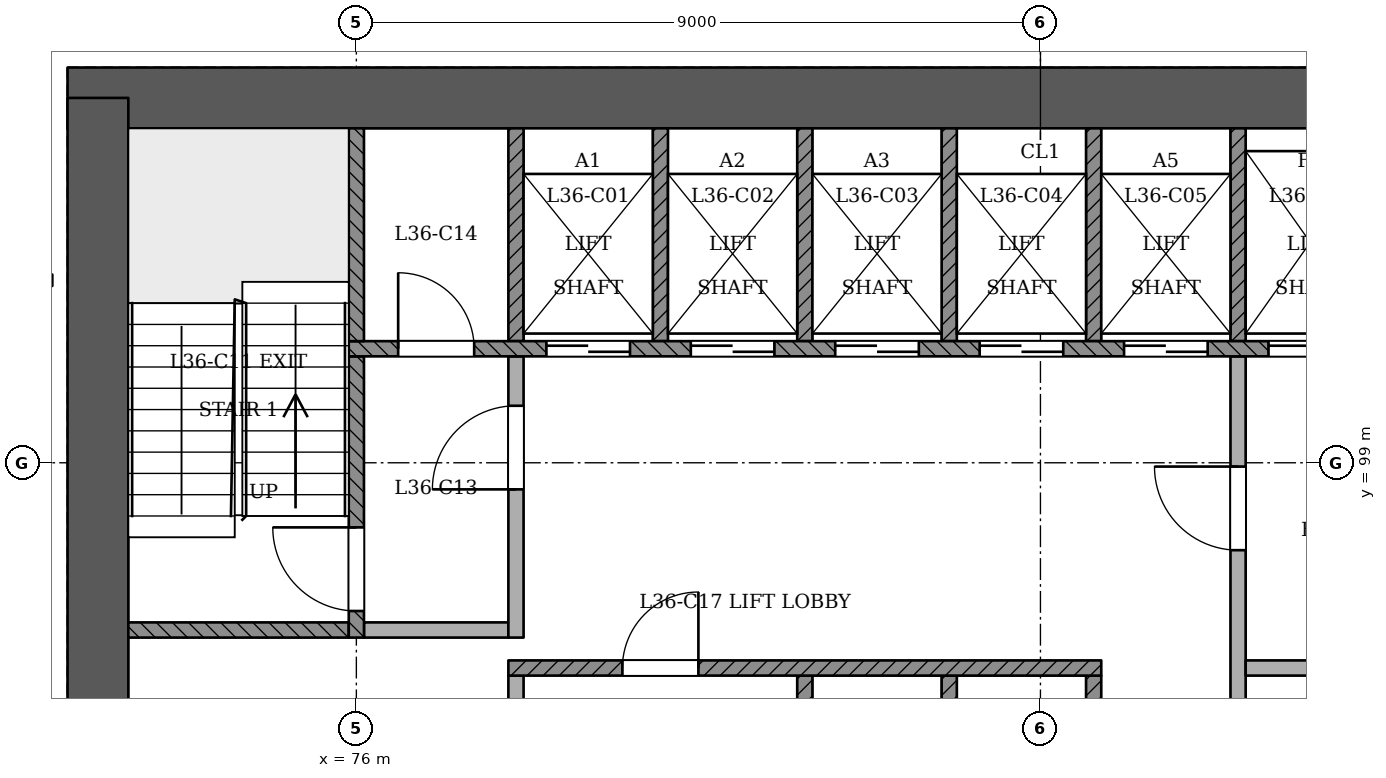
"""IFC4 building model, lengths in metres.
Left out: names, types, materials, properties, quantities, classifications, styles, units other than length and angle.
Written with IfcOpenShell. Run it as: python <this file> out.ifc"""

import sys

from ifc_helpers import new_model, si_unit, direction, frame, frame_2d, origin, place, context, subcontext, project, spatial, rectangle, extrude, element, fill, save


model = new_model("IFC4")
c1 = context("Model", 3, precision=1e-05, world=origin(), true_north=direction((0.0, 1.0)))
c2 = subcontext(c1, "Body", "Model", "MODEL_VIEW")
j1 = project(units=[si_unit("LENGTHUNIT", "METRE"), si_unit("PLANEANGLEUNIT", "RADIAN")], contexts=[c1])
p1 = place(None, origin())
s1 = spatial("IfcSite", under=j1, at=p1, CompositionType="ELEMENT")
p2 = place(p1, origin())
s2 = spatial("IfcBuilding", under=s1, at=p2, CompositionType="ELEMENT")
p3 = place(p2, frame((0.0, 0.0, 142.2)))
s3 = spatial("IfcBuildingStorey", under=s2, at=p3, CompositionType="ELEMENT", Elevation=142.2)
p4 = place(p3, frame((97.4, 103.8, 0.0), z_axis=(0.0, 0.0, 1.0), x_axis=(-1.0, 0.0, 0.0)))
e1 = element("IfcWall", 1, at=p4, inside=s3, PredefinedType="SHEAR", context=c2, shape_type="SweptSolid", body=[
    extrude(rectangle(XDim=25.2, YDim=0.8, at=frame_2d((12.6, 0.0))), origin(), (0.0, 0.0, 1.0), 3.6),
])
p5 = place(p3, frame((72.6, 103.8, 0.0), z_axis=(0.0, 0.0, 1.0), x_axis=(0.0, -1.0, 0.0)))
e2 = element("IfcWall", 2, at=p5, inside=s3, PredefinedType="SHEAR", context=c2, shape_type="SweptSolid", body=[
    extrude(rectangle(XDim=11.2, YDim=0.8, at=frame_2d((5.6, 0.0))), origin(), (0.0, 0.0, 1.0), 3.6),
])
p6 = place(p3, frame((64.449, 99.517, 0.0), z_axis=(0.0, 0.0, 1.0), x_axis=(0.499425839766, -0.866356641675, 0.0)))
e3 = element("IfcWall", 3, at=p6, inside=s3, PredefinedType="PARTITIONING", context=c2, shape_type="SweptSolid", body=[
    extrude(rectangle(XDim=41.118, YDim=0.15, at=frame_2d((20.559, 0.0))), origin(), (0.0, 0.0, 1.0), 2.75),
])
p7 = place(p6, frame((0.951, 0.0, 0.0)))
e4 = element("IfcOpeningElement", 4, at=p7, cuts=e3, PredefinedType="OPENING", context=c2, shape_type="SweptSolid", body=[
    extrude(rectangle(XDim=1.2, YDim=2.1, at=frame_2d((0.6, 1.05))), frame((0.0, 0.085, 0.0), z_axis=(0.0, -1.0, 0.0), x_axis=(1.0, 0.0, 0.0)), (0.0, 0.0, 1.0), 0.171),
])
p8 = place(p6, frame((10.552, 0.0, 0.0)))
e5 = element("IfcOpeningElement", 5, at=p8, cuts=e3, PredefinedType="OPENING", context=c2, shape_type="SweptSolid", body=[
    extrude(rectangle(XDim=1.0, YDim=2.1, at=frame_2d((0.5, 1.05))), frame((0.0, 0.085, 0.0), z_axis=(0.0, -1.0, 0.0), x_axis=(1.0, 0.0, 0.0)), (0.0, 0.0, 1.0), 0.171),
])
p9 = place(p6, frame((12.762, 0.0, 0.0)))
e6 = element("IfcOpeningElement", 6, at=p9, cuts=e3, PredefinedType="OPENING", context=c2, shape_type="SweptSolid", body=[
    extrude(rectangle(XDim=1.0, YDim=2.1, at=frame_2d((0.5, 1.05))), frame((0.0, 0.085, 0.0), z_axis=(0.0, -1.0, 0.0), x_axis=(1.0, 0.0, 0.0)), (0.0, 0.0, 1.0), 0.171),
])
p10 = place(p6, frame((20.557, 0.0, 0.0)))
e7 = element("IfcOpeningElement", 7, at=p10, cuts=e3, PredefinedType="OPENING", context=c2, shape_type="SweptSolid", body=[
    extrude(rectangle(XDim=1.2, YDim=2.1, at=frame_2d((0.6, 1.05))), frame((0.0, 0.085, 0.0), z_axis=(0.0, -1.0, 0.0), x_axis=(1.0, 0.0, 0.0)), (0.0, 0.0, 1.0), 0.171),
])
p11 = place(p6, frame((28.436, 0.0, 0.0)))
e8 = element("IfcOpeningElement", 8, at=p11, cuts=e3, PredefinedType="OPENING", context=c2, shape_type="SweptSolid", body=[
    extrude(rectangle(XDim=1.0, YDim=2.1, at=frame_2d((0.5, 1.05))), frame((0.0, 0.085, 0.0), z_axis=(0.0, -1.0, 0.0), x_axis=(1.0, 0.0, 0.0)), (0.0, 0.0, 1.0), 0.171),
])
p12 = place(p6, frame((32.957, 0.0, 0.0)))
e9 = element("IfcOpeningElement", 9, at=p12, cuts=e3, PredefinedType="OPENING", context=c2, shape_type="SweptSolid", body=[
    extrude(rectangle(XDim=1.2, YDim=2.1, at=frame_2d((0.6, 1.05))), frame((0.0, 0.085, 0.0), z_axis=(0.0, -1.0, 0.0), x_axis=(1.0, 0.0, 0.0)), (0.0, 0.0, 1.0), 0.171),
])
p13 = place(p6, frame((39.53, 0.0, 0.0)))
e10 = element("IfcOpeningElement", 10, at=p13, cuts=e3, PredefinedType="OPENING", context=c2, shape_type="SweptSolid", body=[
    extrude(rectangle(XDim=1.0, YDim=2.1, at=frame_2d((0.5, 1.05))), frame((0.0, 0.085, 0.0), z_axis=(0.0, -1.0, 0.0), x_axis=(1.0, 0.0, 0.0)), (0.0, 0.0, 1.0), 0.171),
])
p14 = place(p3, frame((85.065, 63.98, 0.0), z_axis=(0.0, 0.0, 1.0), x_axis=(0.499427357949, 0.866355766491, 0.0)))
e11 = element("IfcWall", 11, at=p14, inside=s3, PredefinedType="PARTITIONING", context=c2, shape_type="SweptSolid", body=[
    extrude(rectangle(XDim=41.02, YDim=0.15, at=frame_2d((20.51, 0.0))), origin(), (0.0, 0.0, 1.0), 2.75),
])
p15 = place(p14, frame((0.382, 0.0, 0.0)))
e12 = element("IfcOpeningElement", 12, at=p15, cuts=e11, PredefinedType="OPENING", context=c2, shape_type="SweptSolid", body=[
    extrude(rectangle(XDim=1.2, YDim=2.1, at=frame_2d((0.6, 1.05))), frame((0.0, 0.085, 0.0), z_axis=(0.0, -1.0, 0.0), x_axis=(1.0, 0.0, 0.0)), (0.0, 0.0, 1.0), 0.171),
])
p16 = place(p14, frame((2.583, 0.0, 0.0)))
e13 = element("IfcOpeningElement", 13, at=p16, cuts=e11, PredefinedType="OPENING", context=c2, shape_type="SweptSolid", body=[
    extrude(rectangle(XDim=1.0, YDim=2.1, at=frame_2d((0.5, 1.05))), frame((0.0, 0.085, 0.0), z_axis=(0.0, -1.0, 0.0), x_axis=(1.0, 0.0, 0.0)), (0.0, 0.0, 1.0), 0.171),
])
p17 = place(p14, frame((8.113, 0.0, 0.0)))
e14 = element("IfcOpeningElement", 14, at=p17, cuts=e11, PredefinedType="OPENING", context=c2, shape_type="SweptSolid", body=[
    extrude(rectangle(XDim=1.0, YDim=2.1, at=frame_2d((0.5, 1.05))), frame((0.0, 0.085, 0.0), z_axis=(0.0, -1.0, 0.0), x_axis=(1.0, 0.0, 0.0)), (0.0, 0.0, 1.0), 0.171),
])
p18 = place(p14, frame((11.467, 0.0, 0.0)))
e15 = element("IfcOpeningElement", 15, at=p18, cuts=e11, PredefinedType="OPENING", context=c2, shape_type="SweptSolid", body=[
    extrude(rectangle(XDim=1.0, YDim=2.1, at=frame_2d((0.5, 1.05))), frame((0.0, 0.085, 0.0), z_axis=(0.0, -1.0, 0.0), x_axis=(1.0, 0.0, 0.0)), (0.0, 0.0, 1.0), 0.171),
])
p19 = place(p14, frame((18.142, 0.0, 0.0)))
e16 = element("IfcOpeningElement", 16, at=p19, cuts=e11, PredefinedType="OPENING", context=c2, shape_type="SweptSolid", body=[
    extrude(rectangle(XDim=1.0, YDim=2.1, at=frame_2d((0.5, 1.05))), frame((0.0, 0.085, 0.0), z_axis=(0.0, -1.0, 0.0), x_axis=(1.0, 0.0, 0.0)), (0.0, 0.0, 1.0), 0.171),
])
p20 = place(p14, frame((20.583, 0.0, 0.0)))
e17 = element("IfcOpeningElement", 17, at=p20, cuts=e11, PredefinedType="OPENING", context=c2, shape_type="SweptSolid", body=[
    extrude(rectangle(XDim=1.0, YDim=2.1, at=frame_2d((0.5, 1.05))), frame((0.0, 0.085, 0.0), z_axis=(0.0, -1.0, 0.0), x_axis=(1.0, 0.0, 0.0)), (0.0, 0.0, 1.0), 0.171),
])
p21 = place(p14, frame((26.113, 0.0, 0.0)))
e18 = element("IfcOpeningElement", 18, at=p21, cuts=e11, PredefinedType="OPENING", context=c2, shape_type="SweptSolid", body=[
    extrude(rectangle(XDim=1.0, YDim=2.1, at=frame_2d((0.5, 1.05))), frame((0.0, 0.085, 0.0), z_axis=(0.0, -1.0, 0.0), x_axis=(1.0, 0.0, 0.0)), (0.0, 0.0, 1.0), 0.171),
])
p22 = place(p14, frame((33.863, 0.0, 0.0)))
e19 = element("IfcOpeningElement", 19, at=p22, cuts=e11, PredefinedType="OPENING", context=c2, shape_type="SweptSolid", body=[
    extrude(rectangle(XDim=1.2, YDim=2.1, at=frame_2d((0.6, 1.05))), frame((0.0, 0.085, 0.0), z_axis=(0.0, -1.0, 0.0), x_axis=(1.0, 0.0, 0.0)), (0.0, 0.0, 1.0), 0.171),
])
p23 = place(p14, frame((39.545, 0.0, 0.0)))
e20 = element("IfcOpeningElement", 20, at=p23, cuts=e11, PredefinedType="OPENING", context=c2, shape_type="SweptSolid", body=[
    extrude(rectangle(XDim=1.2, YDim=2.1, at=frame_2d((0.6, 1.05))), frame((0.0, 0.085, 0.0), z_axis=(0.0, -1.0, 0.0), x_axis=(1.0, 0.0, 0.0)), (0.0, 0.0, 1.0), 0.171),
])
p24 = place(p3, frame((72.0, 101.401, 0.0), z_axis=(0.0, 0.0, 1.0), x_axis=(-0.999999959988, -0.00028288542, 0.0)))
e21 = element("IfcWall", 21, at=p24, inside=s3, PredefinedType="PARTITIONING", context=c2, shape_type="SweptSolid", body=[
    extrude(rectangle(XDim=1.726, YDim=0.15, at=frame_2d((0.863, 0.0))), origin(), (0.0, 0.0, 1.0), 3.15),
])
p25 = place(p3, frame((78.1, 93.4, 0.0), z_axis=(0.0, 0.0, 1.0), x_axis=(0.0, 1.0, 0.0)))
e22 = element("IfcWall", 22, at=p25, inside=s3, PredefinedType="PARTITIONING", context=c2, shape_type="SweptSolid", body=[
    extrude(rectangle(XDim=2.8, YDim=0.2, at=frame_2d((1.4, 0.0))), origin(), (0.0, 0.0, 1.0), 3.15),
])
for number, where, z_axis, x_axis in (
    (23, (81.9, 93.4, 0.0), (0.0, 0.0, 1.0), (0.0, 1.0, 0.0)),
    (24, (83.8, 93.4, 0.0), (0.0, 0.0, 1.0), (0.0, 1.0, 0.0)),
    (25, (85.7, 93.4, 0.0), (0.0, 0.0, 1.0), (0.0, 1.0, 0.0)),
):
    element("IfcWall", number, at=place(p3, frame(where, z_axis=z_axis, x_axis=x_axis)), inside=s3, PredefinedType="SOLIDWALL", context=c2, shape_type="SweptSolid", body=[
        extrude(rectangle(XDim=2.8, YDim=0.2, at=frame_2d((1.4, 0.0))), origin(), (0.0, 0.0, 1.0), 3.15),
    ])
p26 = place(p3, frame((87.6, 93.4, 0.0), z_axis=(0.0, 0.0, 1.0), x_axis=(0.0, 1.0, 0.0)))
e26 = element("IfcWall", 26, at=p26, inside=s3, PredefinedType="PARTITIONING", context=c2, shape_type="SweptSolid", body=[
    extrude(rectangle(XDim=7.0, YDim=0.2, at=frame_2d((3.5, 0.0))), origin(), (0.0, 0.0, 1.0), 3.15),
])
p27 = place(p26, frame((4.45, 0.0, 0.0)))
e27 = element("IfcOpeningElement", 27, at=p27, cuts=e26, PredefinedType="OPENING", context=c2, shape_type="SweptSolid", body=[
    extrude(rectangle(XDim=1.1, YDim=2.1, at=frame_2d((0.55, 1.05))), frame((0.0, 0.11, 0.0), z_axis=(0.0, -1.0, 0.0), x_axis=(1.0, 0.0, 0.0)), (0.0, 0.0, 1.0), 0.221),
])
p28 = place(p3, frame((78.0, 96.3, 0.0), z_axis=(0.0, 0.0, 1.0), x_axis=(1.0, 0.0, 0.0)))
e28 = element("IfcWall", 28, at=p28, inside=s3, PredefinedType="SOLIDWALL", context=c2, shape_type="SweptSolid", body=[
    extrude(rectangle(XDim=7.8, YDim=0.2, at=frame_2d((3.9, 0.0))), origin(), (0.0, 0.0, 1.0), 3.15),
])
p29 = place(p28, frame((1.5, 0.0, 0.0)))
e29 = element("IfcOpeningElement", 29, at=p29, cuts=e28, PredefinedType="OPENING", context=c2, shape_type="SweptSolid", body=[
    extrude(rectangle(XDim=1.0, YDim=2.1, at=frame_2d((0.5, 1.05))), frame((0.0, 0.11, 0.0), z_axis=(0.0, -1.0, 0.0), x_axis=(1.0, 0.0, 0.0)), (0.0, 0.0, 1.0), 0.221),
])
p30 = place(p3, frame((87.7, 96.3, 0.0), z_axis=(0.0, 0.0, 1.0), x_axis=(1.0, 0.0, 0.0)))
e30 = element("IfcWall", 30, at=p30, inside=s3, PredefinedType="PARTITIONING", context=c2, shape_type="SweptSolid", body=[
    extrude(rectangle(XDim=3.6, YDim=0.2, at=frame_2d((1.8, 0.0))), origin(), (0.0, 0.0, 1.0), 3.15),
])
p31 = place(p3, frame((73.0, 96.8, 0.0), z_axis=(0.0, 0.0, 1.0), x_axis=(1.0, 0.0, 0.0)))
e31 = element("IfcWall", 31, at=p31, inside=s3, PredefinedType="SOLIDWALL", context=c2, shape_type="SweptSolid", body=[
    extrude(rectangle(XDim=2.9, YDim=0.2, at=frame_2d((1.45, 0.0))), origin(), (0.0, 0.0, 1.0), 3.15),
])
p32 = place(p3, frame((76.0, 96.7, 0.0), z_axis=(0.0, 0.0, 1.0), x_axis=(0.0, 1.0, 0.0)))
e32 = element("IfcWall", 32, at=p32, inside=s3, PredefinedType="SOLIDWALL", context=c2, shape_type="SweptSolid", body=[
    extrude(rectangle(XDim=3.7, YDim=0.2, at=frame_2d((1.85, 0.0))), origin(), (0.0, 0.0, 1.0), 3.15),
])
p33 = place(p32, frame((0.35, 0.0, 0.0)))
e33 = element("IfcOpeningElement", 33, at=p33, cuts=e32, PredefinedType="OPENING", context=c2, shape_type="SweptSolid", body=[
    extrude(rectangle(XDim=1.1, YDim=2.1, at=frame_2d((0.55, 1.05))), frame((0.0, 0.11, 0.0), z_axis=(0.0, -1.0, 0.0), x_axis=(1.0, 0.0, 0.0)), (0.0, 0.0, 1.0), 0.221),
])
p34 = place(p3, frame((76.1, 96.8, 0.0), z_axis=(0.0, 0.0, 1.0), x_axis=(1.0, 0.0, 0.0)))
e34 = element("IfcWall", 34, at=p34, inside=s3, PredefinedType="PARTITIONING", context=c2, shape_type="SweptSolid", body=[
    extrude(rectangle(XDim=1.9, YDim=0.2, at=frame_2d((0.95, 0.0))), origin(), (0.0, 0.0, 1.0), 3.15),
])
p35 = place(p3, frame((78.1, 96.7, 0.0), z_axis=(0.0, 0.0, 1.0), x_axis=(0.0, 1.0, 0.0)))
e35 = element("IfcWall", 35, at=p35, inside=s3, PredefinedType="PARTITIONING", context=c2, shape_type="SweptSolid", body=[
    extrude(rectangle(XDim=3.7, YDim=0.2, at=frame_2d((1.85, 0.0))), origin(), (0.0, 0.0, 1.0), 3.15),
])
p36 = place(p35, frame((1.95, 0.0, 0.0)))
e36 = element("IfcOpeningElement", 36, at=p36, cuts=e35, PredefinedType="OPENING", context=c2, shape_type="SweptSolid", body=[
    extrude(rectangle(XDim=1.1, YDim=2.1, at=frame_2d((0.55, 1.05))), frame((0.0, 0.11, 0.0), z_axis=(0.0, -1.0, 0.0), x_axis=(1.0, 0.0, 0.0)), (0.0, 0.0, 1.0), 0.221),
])
p37 = place(p3, frame((75.9, 100.5, 0.0), z_axis=(0.0, 0.0, 1.0), x_axis=(1.0, 0.0, 0.0)))
e37 = element("IfcWall", 37, at=p37, inside=s3, PredefinedType="SOLIDWALL", context=c2, shape_type="SweptSolid", body=[
    extrude(rectangle(XDim=18.2, YDim=0.2, at=frame_2d((9.1, 0.0))), origin(), (0.0, 0.0, 1.0), 3.15),
])
p38 = place(p37, frame((2.6, 0.0, 0.0)))
e38 = element("IfcOpeningElement", 38, at=p38, cuts=e37, PredefinedType="OPENING", context=c2, shape_type="SweptSolid", body=[
    extrude(rectangle(XDim=1.1, YDim=2.1, at=frame_2d((0.55, 1.05))), frame((0.0, 0.11, 0.0), z_axis=(0.0, -1.0, 0.0), x_axis=(1.0, 0.0, 0.0)), (0.0, 0.0, 1.0), 0.221),
])
p39 = place(p37, frame((4.5, 0.0, 0.0)))
e39 = element("IfcOpeningElement", 39, at=p39, cuts=e37, PredefinedType="OPENING", context=c2, shape_type="SweptSolid", body=[
    extrude(rectangle(XDim=1.1, YDim=2.1, at=frame_2d((0.55, 1.05))), frame((0.0, 0.11, 0.0), z_axis=(0.0, -1.0, 0.0), x_axis=(1.0, 0.0, 0.0)), (0.0, 0.0, 1.0), 0.221),
])
p40 = place(p37, frame((6.4, 0.0, 0.0)))
e40 = element("IfcOpeningElement", 40, at=p40, cuts=e37, PredefinedType="OPENING", context=c2, shape_type="SweptSolid", body=[
    extrude(rectangle(XDim=1.1, YDim=2.1, at=frame_2d((0.55, 1.05))), frame((0.0, 0.11, 0.0), z_axis=(0.0, -1.0, 0.0), x_axis=(1.0, 0.0, 0.0)), (0.0, 0.0, 1.0), 0.221),
])
p41 = place(p37, frame((8.3, 0.0, 0.0)))
e41 = element("IfcOpeningElement", 41, at=p41, cuts=e37, PredefinedType="OPENING", context=c2, shape_type="SweptSolid", body=[
    extrude(rectangle(XDim=1.1, YDim=2.1, at=frame_2d((0.55, 1.05))), frame((0.0, 0.11, 0.0), z_axis=(0.0, -1.0, 0.0), x_axis=(1.0, 0.0, 0.0)), (0.0, 0.0, 1.0), 0.221),
])
p42 = place(p37, frame((10.2, 0.0, 0.0)))
e42 = element("IfcOpeningElement", 42, at=p42, cuts=e37, PredefinedType="OPENING", context=c2, shape_type="SweptSolid", body=[
    extrude(rectangle(XDim=1.1, YDim=2.1, at=frame_2d((0.55, 1.05))), frame((0.0, 0.11, 0.0), z_axis=(0.0, -1.0, 0.0), x_axis=(1.0, 0.0, 0.0)), (0.0, 0.0, 1.0), 0.221),
])
p43 = place(p37, frame((12.1, 0.0, 0.0)))
e43 = element("IfcOpeningElement", 43, at=p43, cuts=e37, PredefinedType="OPENING", context=c2, shape_type="SweptSolid", body=[
    extrude(rectangle(XDim=1.1, YDim=2.1, at=frame_2d((0.55, 1.05))), frame((0.0, 0.11, 0.0), z_axis=(0.0, -1.0, 0.0), x_axis=(1.0, 0.0, 0.0)), (0.0, 0.0, 1.0), 0.221),
])
p44 = place(p37, frame((14.0, 0.0, 0.0)))
e44 = element("IfcOpeningElement", 44, at=p44, cuts=e37, PredefinedType="OPENING", context=c2, shape_type="SweptSolid", body=[
    extrude(rectangle(XDim=1.1, YDim=2.1, at=frame_2d((0.55, 1.05))), frame((0.0, 0.11, 0.0), z_axis=(0.0, -1.0, 0.0), x_axis=(1.0, 0.0, 0.0)), (0.0, 0.0, 1.0), 0.221),
])
p45 = place(p37, frame((0.65, 0.0, 0.0)))
e45 = element("IfcOpeningElement", 45, at=p45, cuts=e37, PredefinedType="OPENING", context=c2, shape_type="SweptSolid", body=[
    extrude(rectangle(XDim=1.0, YDim=2.1, at=frame_2d((0.5, 1.05))), frame((0.0, 0.11, 0.0), z_axis=(0.0, -1.0, 0.0), x_axis=(1.0, 0.0, 0.0)), (0.0, 0.0, 1.0), 0.221),
])
p46 = place(p37, frame((16.3, 0.0, 0.0)))
e46 = element("IfcOpeningElement", 46, at=p46, cuts=e37, PredefinedType="OPENING", context=c2, shape_type="SweptSolid", body=[
    extrude(rectangle(XDim=1.0, YDim=2.1, at=frame_2d((0.5, 1.05))), frame((0.0, 0.11, 0.0), z_axis=(0.0, -1.0, 0.0), x_axis=(1.0, 0.0, 0.0)), (0.0, 0.0, 1.0), 0.221),
])
for number, where, z_axis, x_axis in (
    (47, (76.0, 100.6, 0.0), (0.0, 0.0, 1.0), (0.0, 1.0, 0.0)),
    (48, (78.1, 100.6, 0.0), (0.0, 0.0, 1.0), (0.0, 1.0, 0.0)),
    (49, (80.0, 100.6, 0.0), (0.0, 0.0, 1.0), (0.0, 1.0, 0.0)),
    (50, (81.9, 100.6, 0.0), (0.0, 0.0, 1.0), (0.0, 1.0, 0.0)),
    (51, (83.8, 100.6, 0.0), (0.0, 0.0, 1.0), (0.0, 1.0, 0.0)),
    (52, (85.7, 100.6, 0.0), (0.0, 0.0, 1.0), (0.0, 1.0, 0.0)),
    (53, (87.6, 100.6, 0.0), (0.0, 0.0, 1.0), (0.0, 1.0, 0.0)),
):
    element("IfcWall", number, at=place(p3, frame(where, z_axis=z_axis, x_axis=x_axis)), inside=s3, PredefinedType="SOLIDWALL", context=c2, shape_type="SweptSolid", body=[
        extrude(rectangle(XDim=2.8, YDim=0.2, at=frame_2d((1.4, 0.0))), origin(), (0.0, 0.0, 1.0), 3.15),
    ])
p47 = place(p38, origin())
e54 = element("IfcDoor", 54, at=p47, inside=s3, OperationType="SLIDING_TO_RIGHT", PredefinedType="NOTDEFINED", context=c2, shape_type="SweptSolid", body=[
    extrude(rectangle(XDim=1.1, YDim=2.1, at=frame_2d((0.55, 1.05))), frame((0.0, 0.025, 0.0), z_axis=(0.0, -1.0, 0.0), x_axis=(1.0, 0.0, 0.0)), (0.0, 0.0, 1.0), 0.05),
])
fill(e38, e54)
p48 = place(p39, origin())
e55 = element("IfcDoor", 55, at=p48, inside=s3, OperationType="SLIDING_TO_LEFT", PredefinedType="NOTDEFINED", context=c2, shape_type="SweptSolid", body=[
    extrude(rectangle(XDim=1.1, YDim=2.1, at=frame_2d((0.55, 1.05))), frame((0.0, 0.025, 0.0), z_axis=(0.0, -1.0, 0.0), x_axis=(1.0, 0.0, 0.0)), (0.0, 0.0, 1.0), 0.05),
])
fill(e39, e55)
p49 = place(p40, origin())
e56 = element("IfcDoor", 56, at=p49, inside=s3, OperationType="SLIDING_TO_RIGHT", PredefinedType="NOTDEFINED", context=c2, shape_type="SweptSolid", body=[
    extrude(rectangle(XDim=1.1, YDim=2.1, at=frame_2d((0.55, 1.05))), frame((0.0, 0.025, 0.0), z_axis=(0.0, -1.0, 0.0), x_axis=(1.0, 0.0, 0.0)), (0.0, 0.0, 1.0), 0.05),
])
fill(e40, e56)
p50 = place(p41, origin())
e57 = element("IfcDoor", 57, at=p50, inside=s3, OperationType="SLIDING_TO_LEFT", PredefinedType="NOTDEFINED", context=c2, shape_type="SweptSolid", body=[
    extrude(rectangle(XDim=1.1, YDim=2.1, at=frame_2d((0.55, 1.05))), frame((0.0, 0.025, 0.0), z_axis=(0.0, -1.0, 0.0), x_axis=(1.0, 0.0, 0.0)), (0.0, 0.0, 1.0), 0.05),
])
fill(e41, e57)
p51 = place(p42, origin())
e58 = element("IfcDoor", 58, at=p51, inside=s3, OperationType="SLIDING_TO_RIGHT", PredefinedType="NOTDEFINED", context=c2, shape_type="SweptSolid", body=[
    extrude(rectangle(XDim=1.1, YDim=2.1, at=frame_2d((0.55, 1.05))), frame((0.0, 0.025, 0.0), z_axis=(0.0, -1.0, 0.0), x_axis=(1.0, 0.0, 0.0)), (0.0, 0.0, 1.0), 0.05),
])
fill(e42, e58)
p52 = place(p43, origin())
e59 = element("IfcDoor", 59, at=p52, inside=s3, OperationType="SLIDING_TO_RIGHT", PredefinedType="NOTDEFINED", context=c2, shape_type="SweptSolid", body=[
    extrude(rectangle(XDim=1.1, YDim=2.1, at=frame_2d((0.55, 1.05))), frame((0.0, 0.025, 0.0), z_axis=(0.0, -1.0, 0.0), x_axis=(1.0, 0.0, 0.0)), (0.0, 0.0, 1.0), 0.05),
])
fill(e43, e59)
p53 = place(p33, origin())
e60 = element("IfcDoor", 60, at=p53, inside=s3, OperationType="SINGLE_SWING_RIGHT", PredefinedType="NOTDEFINED", context=c2, shape_type="SweptSolid", body=[
    extrude(rectangle(XDim=1.1, YDim=2.1, at=frame_2d((0.55, 1.05))), frame((0.0, 0.025, 0.0), z_axis=(0.0, -1.0, 0.0), x_axis=(1.0, 0.0, 0.0)), (0.0, 0.0, 1.0), 0.05),
])
fill(e33, e60)
p54 = place(p36, origin())
e61 = element("IfcDoor", 61, at=p54, inside=s3, OperationType="SINGLE_SWING_LEFT", PredefinedType="NOTDEFINED", context=c2, shape_type="SweptSolid", body=[
    extrude(rectangle(XDim=1.1, YDim=2.1, at=frame_2d((0.55, 1.05))), frame((0.0, 0.025, 0.0), z_axis=(0.0, -1.0, 0.0), x_axis=(1.0, 0.0, 0.0)), (0.0, 0.0, 1.0), 0.05),
])
fill(e36, e61)
p55 = place(p27, origin())
e62 = element("IfcDoor", 62, at=p55, inside=s3, OperationType="SINGLE_SWING_RIGHT", PredefinedType="NOTDEFINED", context=c2, shape_type="SweptSolid", body=[
    extrude(rectangle(XDim=1.1, YDim=2.1, at=frame_2d((0.55, 1.05))), frame((0.0, 0.025, 0.0), z_axis=(0.0, -1.0, 0.0), x_axis=(1.0, 0.0, 0.0)), (0.0, 0.0, 1.0), 0.05),
])
fill(e27, e62)
p56 = place(p45, origin())
e63 = element("IfcDoor", 63, at=p56, inside=s3, OperationType="SINGLE_SWING_LEFT", PredefinedType="NOTDEFINED", context=c2, shape_type="SweptSolid", body=[
    extrude(rectangle(XDim=1.0, YDim=2.1, at=frame_2d((0.5, 1.05))), frame((0.0, 0.025, 0.0), z_axis=(0.0, -1.0, 0.0), x_axis=(1.0, 0.0, 0.0)), (0.0, 0.0, 1.0), 0.05),
])
fill(e45, e63)
p57 = place(p29, origin())
e64 = element("IfcDoor", 64, at=p57, inside=s3, OperationType="SINGLE_SWING_RIGHT", PredefinedType="NOTDEFINED", context=c2, shape_type="SweptSolid", body=[
    extrude(rectangle(XDim=1.0, YDim=2.1, at=frame_2d((0.5, 1.05))), frame((0.0, 0.025, 0.0), z_axis=(0.0, -1.0, 0.0), x_axis=(1.0, 0.0, 0.0)), (0.0, 0.0, 1.0), 0.05),
])
fill(e29, e64)
save(model, sys.argv[1])
